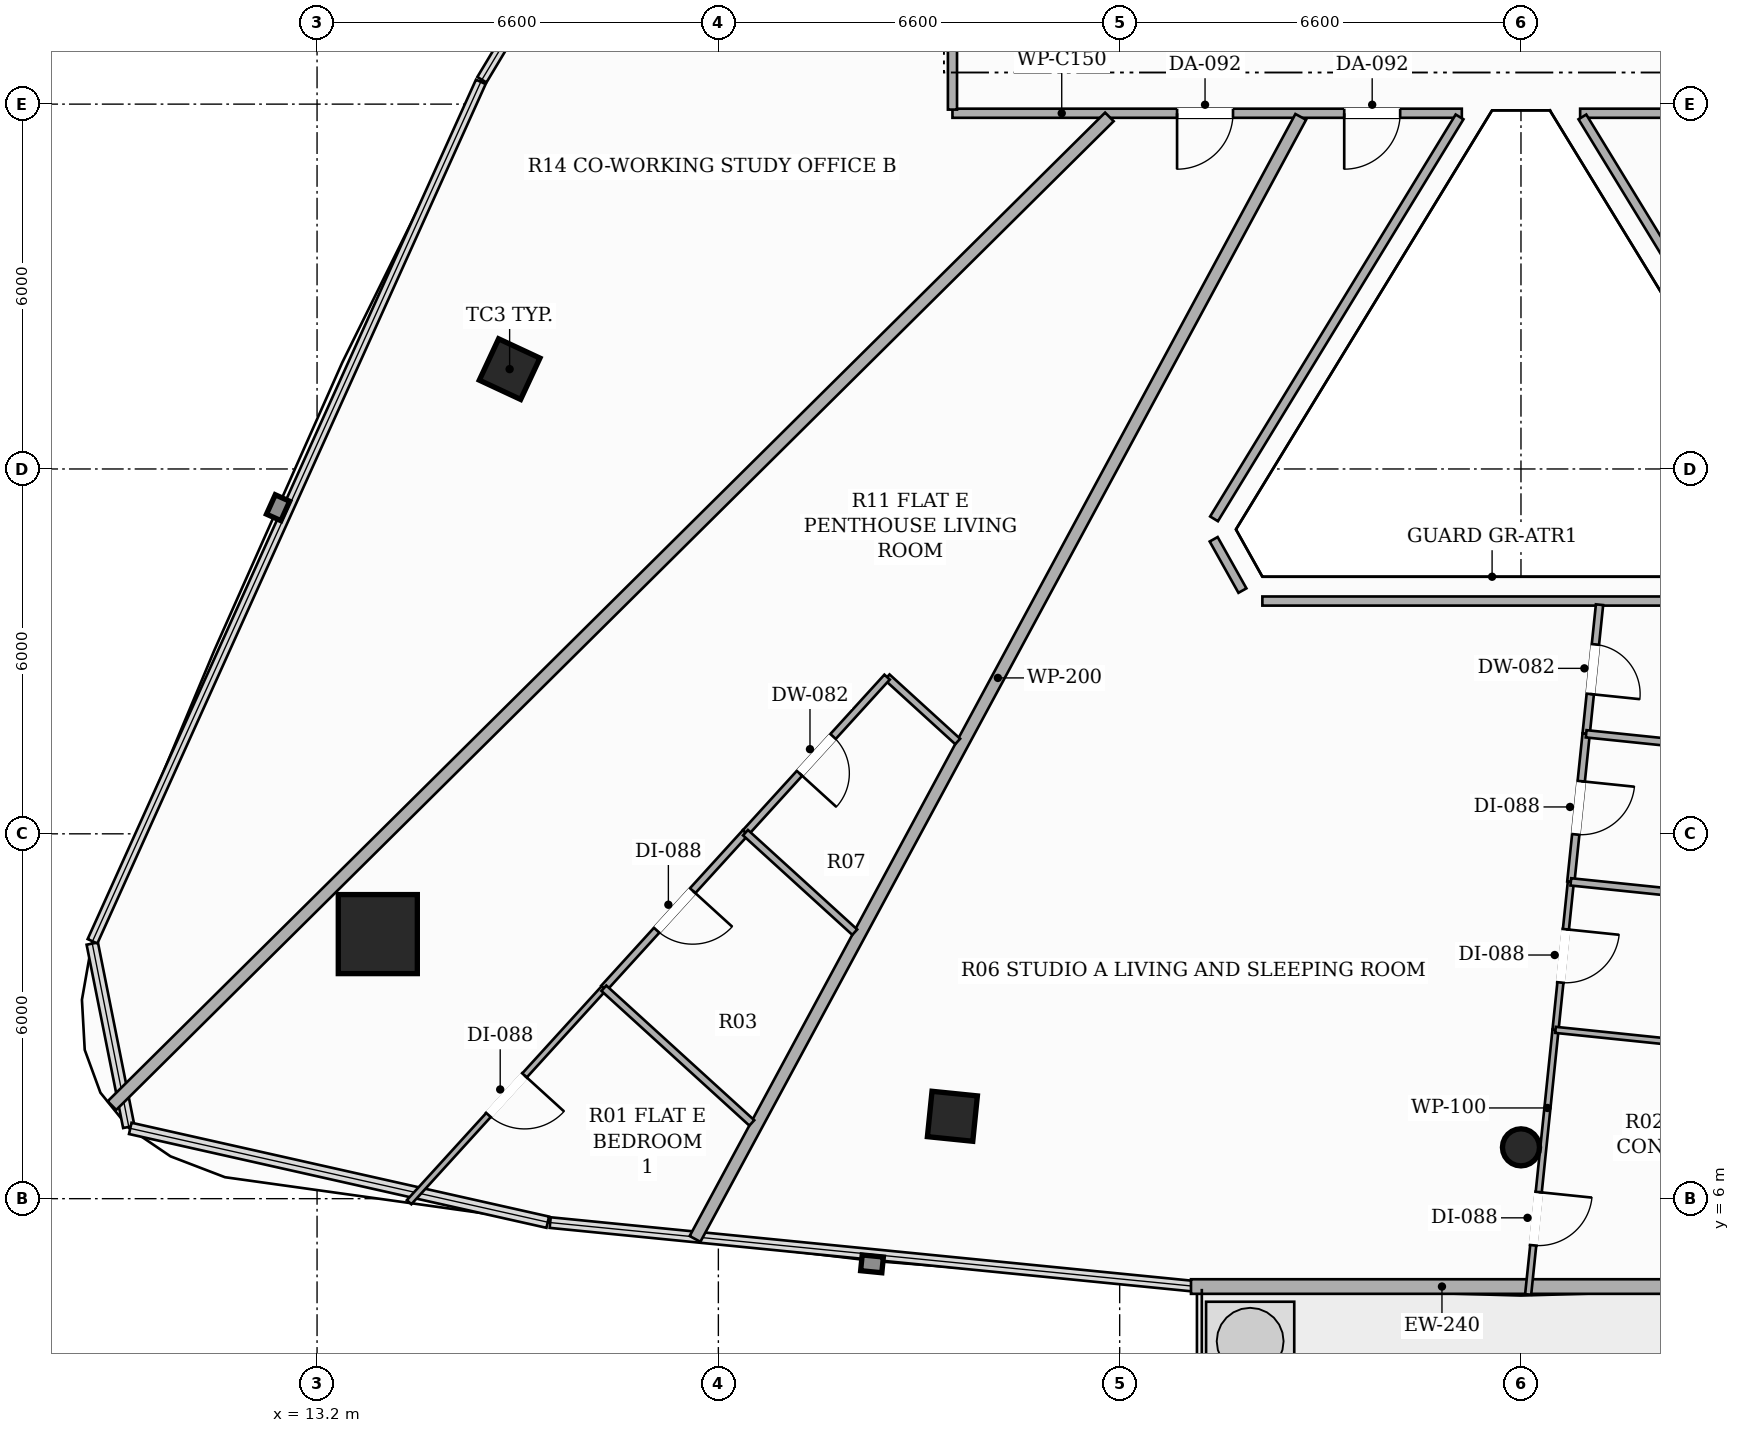
"""IFC4 building model, lengths in metres.
Left out: names, types, materials, properties, quantities, classifications, styles, units other than length and angle.
Written with IfcOpenShell. Run it as: python <this file> out.ifc"""

import sys

from ifc_helpers import new_model, si_unit, direction, frame, frame_2d, origin, origin_2d, place, context, subcontext, project, spatial, rectangle, hollow_rectangle, hollow_circle, extrude, element, fill, save


model = new_model("IFC4")
c1 = context("Model", 3, precision=1e-05, world=origin(), true_north=direction((0.0, 1.0)))
c2 = subcontext(c1, "Body", "Model", "MODEL_VIEW")
j1 = project(units=[si_unit("LENGTHUNIT", "METRE"), si_unit("PLANEANGLEUNIT", "RADIAN")], contexts=[c1])
p1 = place(None, origin())
s1 = spatial("IfcSite", under=j1, at=p1, CompositionType="ELEMENT")
p2 = place(p1, origin())
s2 = spatial("IfcBuilding", under=s1, at=p2, CompositionType="ELEMENT")
p3 = place(p2, frame((0.0, 0.0, 196.4)))
s3 = spatial("IfcBuildingStorey", under=s2, at=p3, CompositionType="ELEMENT", Elevation=196.4)
p4 = place(p3, frame((14.199, 10.351, 0.0), z_axis=(0.0, 0.0, 1.0), x_axis=(1.0, 0.0, 0.0)))
e1 = element("IfcColumn", 1, at=p4, inside=s3, PredefinedType="COLUMN", context=c2, shape_type="SweptSolid", body=[
    extrude(hollow_rectangle(XDim=1.3, YDim=1.3, WallThickness=0.04, at=origin_2d()), origin(), (0.0, 0.0, 1.0), 3.3),
])
for number, where, z_axis, x_axis in (
    (2, (16.367, 19.642, 0.0), (0.0, 0.0, 1.0), (0.423, 0.906, 0.0)),
    (3, (23.649, 7.355, 0.0), (0.0, 0.0, 1.0), (-0.995, 0.101, 0.0)),
):
    element("IfcColumn", number, at=place(p3, frame(where, z_axis=z_axis, x_axis=x_axis)), inside=s3, PredefinedType="COLUMN", context=c2, shape_type="SweptSolid", body=[
        extrude(hollow_rectangle(XDim=0.75, YDim=0.75, WallThickness=0.025, at=origin_2d()), origin(), (0.0, 0.0, 1.0), 3.3),
    ])
p5 = place(p3, frame((33.0, 6.844, 0.0), z_axis=(0.0, 0.0, 1.0), x_axis=(1.0, 0.0, 0.0)))
e4 = element("IfcColumn", 4, at=p5, inside=s3, PredefinedType="COLUMN", context=c2, shape_type="SweptSolid", body=[
    extrude(hollow_circle(Radius=0.305, WallThickness=0.016, at=origin_2d()), origin(), (0.0, 0.0, 1.0), 3.3),
])
p6 = place(p3, frame((27.573, 4.555, 0.0), z_axis=(0.0, 0.0, 1.0), x_axis=(1.0, 0.0, 0.0)))
e5 = element("IfcWall", 5, at=p6, inside=s3, PredefinedType="SOLIDWALL", context=c2, shape_type="SweptSolid", body=[
    extrude(rectangle(XDim=10.854, YDim=0.24, at=frame_2d((5.427, 0.0))), origin(), (0.0, 0.0, 1.0), 2.624),
])
p7 = place(p6, frame((8.355, 0.0, 0.0)))
e6 = element("IfcOpeningElement", 6, at=p7, cuts=e5, PredefinedType="OPENING", context=c2, shape_type="SweptSolid", body=[
    extrude(rectangle(XDim=1.8, YDim=2.2, at=frame_2d((0.9, 1.1))), frame((0.0, 0.13, 0.0), z_axis=(0.0, -1.0, 0.0), x_axis=(1.0, 0.0, 0.0)), (0.0, 0.0, 1.0), 0.26),
])
p8 = place(p3, frame((32.027, 23.85, 0.0), z_axis=(0.0, 0.0, 1.0), x_axis=(-1.0, 0.0, 0.0)))
e7 = element("IfcWall", 7, at=p8, inside=s3, PredefinedType="PARTITIONING", context=c2, shape_type="SweptSolid", body=[
    extrude(rectangle(XDim=8.377, YDim=0.15, at=frame_2d((4.188, 0.0))), origin(), (0.0, 0.0, 1.0), 2.565),
])
p9 = place(p8, frame((1.014, 0.0, 0.0)))
e8 = element("IfcOpeningElement", 8, at=p9, cuts=e7, PredefinedType="OPENING", context=c2, shape_type="SweptSolid", body=[
    extrude(rectangle(XDim=0.92, YDim=2.15, at=frame_2d((0.46, 1.075))), frame((0.0, 0.085, 0.0), z_axis=(0.0, -1.0, 0.0), x_axis=(1.0, 0.0, 0.0)), (0.0, 0.0, 1.0), 0.17),
])
p10 = place(p8, frame((3.763, 0.0, 0.0)))
e9 = element("IfcOpeningElement", 9, at=p10, cuts=e7, PredefinedType="OPENING", context=c2, shape_type="SweptSolid", body=[
    extrude(rectangle(XDim=0.92, YDim=2.15, at=frame_2d((0.46, 1.075))), frame((0.0, 0.085, 0.0), z_axis=(0.0, -1.0, 0.0), x_axis=(1.0, 0.0, 0.0)), (0.0, 0.0, 1.0), 0.17),
])
p11 = place(p3, frame((23.65, 23.91, 0.0), z_axis=(0.0, 0.0, 1.0), x_axis=(0.0, 1.0, 0.0)))
e10 = element("IfcWall", 10, at=p11, inside=s3, PredefinedType="PARTITIONING", context=c2, shape_type="SweptSolid", body=[
    extrude(rectangle(XDim=12.715, YDim=0.15, at=frame_2d((6.357, 0.0))), origin(), (0.0, 0.0, 1.0), 2.492),
])
p12 = place(p11, frame((5.917, 0.0, 0.0)))
e11 = element("IfcOpeningElement", 11, at=p12, cuts=e10, PredefinedType="OPENING", context=c2, shape_type="SweptSolid", body=[
    extrude(rectangle(XDim=0.88, YDim=2.1, at=frame_2d((0.44, 1.05))), frame((0.0, 0.085, 0.0), z_axis=(0.0, -1.0, 0.0), x_axis=(1.0, 0.0, 0.0)), (0.0, 0.0, 1.0), 0.17),
])
p13 = place(p3, frame((42.19, 23.85, 0.0), z_axis=(0.0, 0.0, 1.0), x_axis=(-1.0, 0.0, 0.0)))
e12 = element("IfcWall", 12, at=p13, inside=s3, PredefinedType="PARTITIONING", context=c2, shape_type="SweptSolid", body=[
    extrude(rectangle(XDim=8.217, YDim=0.15, at=frame_2d((4.108, 0.0))), origin(), (0.0, 0.0, 1.0), 2.565),
])
p14 = place(p13, frame((1.67, 0.0, 0.0)))
e13 = element("IfcOpeningElement", 13, at=p14, cuts=e12, PredefinedType="OPENING", context=c2, shape_type="SweptSolid", body=[
    extrude(rectangle(XDim=0.92, YDim=2.15, at=frame_2d((0.46, 1.075))), frame((0.0, 0.085, 0.0), z_axis=(0.0, -1.0, 0.0), x_axis=(1.0, 0.0, 0.0)), (0.0, 0.0, 1.0), 0.17),
])
p15 = place(p13, frame((5.12, 0.0, 0.0)))
e14 = element("IfcOpeningElement", 14, at=p15, cuts=e12, PredefinedType="OPENING", context=c2, shape_type="SweptSolid", body=[
    extrude(rectangle(XDim=0.88, YDim=2.1, at=frame_2d((0.44, 1.05))), frame((0.0, 0.085, 0.0), z_axis=(0.0, -1.0, 0.0), x_axis=(1.0, 0.0, 0.0)), (0.0, 0.0, 1.0), 0.17),
])
p16 = place(p3, frame((34.01, 23.79, 0.0), z_axis=(0.0, 0.0, 1.0), x_axis=(0.521316137909, -0.853363629618, 0.0)))
e15 = element("IfcWall", 15, at=p16, inside=s3, PredefinedType="PARTITIONING", context=c2, shape_type="SweptSolid", body=[
    extrude(rectangle(XDim=7.746, YDim=0.15, at=frame_2d((3.873, 0.0))), origin(), (0.0, 0.0, 1.0), 2.773),
])
p17 = place(p3, frame((37.253, 15.828, 0.0), z_axis=(0.0, 0.0, 1.0), x_axis=(-1.0, 0.0, 0.0)))
e16 = element("IfcWall", 16, at=p17, inside=s3, PredefinedType="PARTITIONING", context=c2, shape_type="SweptSolid", body=[
    extrude(rectangle(XDim=8.506, YDim=0.15, at=frame_2d((4.253, 0.0))), origin(), (0.0, 0.0, 1.0), 2.773),
])
p18 = place(p3, frame((28.419, 16.0, 0.0), z_axis=(0.0, 0.0, 1.0), x_axis=(-0.488810833005, 0.872389803664, 0.0)))
e17 = element("IfcWall", 17, at=p18, inside=s3, PredefinedType="PARTITIONING", context=c2, shape_type="SweptSolid", body=[
    extrude(rectangle(XDim=0.968, YDim=0.15, at=frame_2d((0.484, 0.0))), origin(), (0.0, 0.0, 1.0), 3.06),
])
p19 = place(p3, frame((27.952, 17.18, 0.0), z_axis=(0.0, 0.0, 1.0), x_axis=(0.521316137909, 0.853363629618, 0.0)))
e18 = element("IfcWall", 18, at=p19, inside=s3, PredefinedType="PARTITIONING", context=c2, shape_type="SweptSolid", body=[
    extrude(rectangle(XDim=7.746, YDim=0.15, at=frame_2d((3.873, 0.0))), origin(), (0.0, 0.0, 1.0), 2.773),
])
p20 = place(p3, frame((19.416, 5.338, 0.0), z_axis=(0.0, 0.0, 1.0), x_axis=(0.475065982754, 0.879950175879, 0.0)))
e19 = element("IfcWall", 19, at=p20, inside=s3, PredefinedType="PARTITIONING", context=c2, shape_type="SweptSolid", body=[
    extrude(rectangle(XDim=20.969, YDim=0.2, at=frame_2d((10.485, 0.0))), origin(), (0.0, 0.0, 1.0), 2.492),
])
p21 = place(p3, frame((26.231, 23.79, 0.0), z_axis=(0.0, 0.0, 1.0), x_axis=(-0.710239236144, -0.703960387693, 0.0)))
e20 = element("IfcWall", 20, at=p21, inside=s3, PredefinedType="PARTITIONING", context=c2, shape_type="SweptSolid", body=[
    extrude(rectangle(XDim=23.096, YDim=0.2, at=frame_2d((11.548, 0.0))), origin(), (0.0, 0.0, 1.0), 2.492),
])
p22 = place(p3, frame((34.292, 15.768, 0.0), z_axis=(0.0, 0.0, 1.0), x_axis=(-0.103059151492, -0.994675229054, 0.0)))
e21 = element("IfcWall", 21, at=p22, inside=s3, PredefinedType="PARTITIONING", context=c2, shape_type="SweptSolid", body=[
    extrude(rectangle(XDim=2.135, YDim=0.12, at=frame_2d((1.067, 0.0))), origin(), (0.0, 0.0, 1.0), 3.06),
])
p23 = place(p22, frame((0.657, 0.0, 0.0)))
e22 = element("IfcOpeningElement", 22, at=p23, cuts=e21, PredefinedType="OPENING", context=c2, shape_type="SweptSolid", body=[
    extrude(rectangle(XDim=0.82, YDim=2.1, at=frame_2d((0.41, 1.05))), frame((0.0, 0.07, 0.0), z_axis=(0.0, -1.0, 0.0), x_axis=(1.0, 0.0, 0.0)), (0.0, 0.0, 1.0), 0.14),
])
p24 = place(p3, frame((34.072, 13.645, 0.0), z_axis=(0.0, 0.0, 1.0), x_axis=(-0.102919566026, -0.994689681724, 0.0)))
e23 = element("IfcWall", 23, at=p24, inside=s3, PredefinedType="PARTITIONING", context=c2, shape_type="SweptSolid", body=[
    extrude(rectangle(XDim=2.448, YDim=0.12, at=frame_2d((1.224, 0.0))), origin(), (0.0, 0.0, 1.0), 3.06),
])
p25 = place(p24, frame((0.784, 0.0, 0.0)))
e24 = element("IfcOpeningElement", 24, at=p25, cuts=e23, PredefinedType="OPENING", context=c2, shape_type="SweptSolid", body=[
    extrude(rectangle(XDim=0.88, YDim=2.1, at=frame_2d((0.44, 1.05))), frame((0.0, 0.07, 0.0), z_axis=(0.0, -1.0, 0.0), x_axis=(1.0, 0.0, 0.0)), (0.0, 0.0, 1.0), 0.14),
])
p26 = place(p3, frame((33.568, 8.776, 0.0), z_axis=(0.0, 0.0, 1.0), x_axis=(-0.1029239069, -0.994689232569, 0.0)))
e25 = element("IfcWall", 25, at=p26, inside=s3, PredefinedType="PARTITIONING", context=c2, shape_type="SweptSolid", body=[
    extrude(rectangle(XDim=4.374, YDim=0.1, at=frame_2d((2.187, 0.0))), origin(), (0.0, 0.0, 1.0), 2.492),
])
p27 = place(p26, frame((2.682, 0.0, 0.0)))
e26 = element("IfcOpeningElement", 26, at=p27, cuts=e25, PredefinedType="OPENING", context=c2, shape_type="SweptSolid", body=[
    extrude(rectangle(XDim=0.88, YDim=2.1, at=frame_2d((0.44, 1.05))), frame((0.0, 0.06, 0.0), z_axis=(0.0, -1.0, 0.0), x_axis=(1.0, 0.0, 0.0)), (0.0, 0.0, 1.0), 0.12),
])
p28 = place(p3, frame((33.82, 11.21, 0.0), z_axis=(0.0, 0.0, 1.0), x_axis=(-0.102960420087, -0.994685453747, 0.0)))
e27 = element("IfcWall", 27, at=p28, inside=s3, PredefinedType="PARTITIONING", context=c2, shape_type="SweptSolid", body=[
    extrude(rectangle(XDim=2.447, YDim=0.1, at=frame_2d((1.224, 0.0))), origin(), (0.0, 0.0, 1.0), 3.06),
])
p29 = place(p28, frame((0.784, 0.0, 0.0)))
e28 = element("IfcOpeningElement", 28, at=p29, cuts=e27, PredefinedType="OPENING", context=c2, shape_type="SweptSolid", body=[
    extrude(rectangle(XDim=0.88, YDim=2.1, at=frame_2d((0.44, 1.05))), frame((0.0, 0.06, 0.0), z_axis=(0.0, -1.0, 0.0), x_axis=(1.0, 0.0, 0.0)), (0.0, 0.0, 1.0), 0.12),
])
p30 = place(p3, frame((38.025, 13.236, 0.0), z_axis=(0.0, 0.0, 1.0), x_axis=(-0.99469136016, 0.102903343108, 0.0)))
e29 = element("IfcWall", 29, at=p30, inside=s3, PredefinedType="PARTITIONING", context=c2, shape_type="SweptSolid", body=[
    extrude(rectangle(XDim=3.974, YDim=0.12, at=frame_2d((1.987, 0.0))), origin(), (0.0, 0.0, 1.0), 2.773),
])
p31 = place(p3, frame((38.777, 10.698, 0.0), z_axis=(0.0, 0.0, 1.0), x_axis=(-0.994708898019, 0.102733676081, 0.0)))
e30 = element("IfcWall", 30, at=p31, inside=s3, PredefinedType="PARTITIONING", context=c2, shape_type="SweptSolid", body=[
    extrude(rectangle(XDim=4.983, YDim=0.12, at=frame_2d((2.492, 0.0))), origin(), (0.0, 0.0, 1.0), 2.773),
])
p32 = place(p3, frame((33.568, 8.776, 0.0), z_axis=(0.0, 0.0, 1.0), x_axis=(0.994686760155, -0.102947798284, 0.0)))
e31 = element("IfcWall", 31, at=p32, inside=s3, PredefinedType="PARTITIONING", context=c2, shape_type="SweptSolid", body=[
    extrude(rectangle(XDim=5.993, YDim=0.1, at=frame_2d((2.996, 0.0))), origin(), (0.0, 0.0, 1.0), 2.773),
])
p33 = place(p3, frame((23.736, 13.519, 0.0), z_axis=(0.0, 0.0, 1.0), x_axis=(-0.739215251716, 0.673469235846, 0.0)))
e32 = element("IfcWall", 32, at=p33, inside=s3, PredefinedType="PARTITIONING", context=c2, shape_type="SweptSolid", body=[
    extrude(rectangle(XDim=1.571, YDim=0.12, at=frame_2d((0.785, 0.0))), origin(), (0.0, 0.0, 1.0), 3.06),
])
p34 = place(p3, frame((22.575, 14.577, 0.0), z_axis=(0.0, 0.0, 1.0), x_axis=(-0.673231148277, -0.739432093563, 0.0)))
e33 = element("IfcWall", 33, at=p34, inside=s3, PredefinedType="PARTITIONING", context=c2, shape_type="SweptSolid", body=[
    extrude(rectangle(XDim=3.459, YDim=0.12, at=frame_2d((1.729, 0.0))), origin(), (0.0, 0.0, 1.0), 2.773),
])
p35 = place(p34, frame((1.32, 0.0, 0.0)))
e34 = element("IfcOpeningElement", 34, at=p35, cuts=e33, PredefinedType="OPENING", context=c2, shape_type="SweptSolid", body=[
    extrude(rectangle(XDim=0.82, YDim=2.1, at=frame_2d((0.41, 1.05))), frame((0.0, 0.07, 0.0), z_axis=(0.0, -1.0, 0.0), x_axis=(1.0, 0.0, 0.0)), (0.0, 0.0, 1.0), 0.14),
])
p36 = place(p3, frame((20.246, 12.019, 0.0), z_axis=(0.0, 0.0, 1.0), x_axis=(-0.673234602732, -0.739428948368, 0.0)))
e35 = element("IfcWall", 35, at=p36, inside=s3, PredefinedType="PARTITIONING", context=c2, shape_type="SweptSolid", body=[
    extrude(rectangle(XDim=3.459, YDim=0.12, at=frame_2d((1.73, 0.0))), origin(), (0.0, 0.0, 1.0), 2.492),
])
p37 = place(p36, frame((1.29, 0.0, 0.0)))
e36 = element("IfcOpeningElement", 36, at=p37, cuts=e35, PredefinedType="OPENING", context=c2, shape_type="SweptSolid", body=[
    extrude(rectangle(XDim=0.88, YDim=2.1, at=frame_2d((0.44, 1.05))), frame((0.0, 0.07, 0.0), z_axis=(0.0, -1.0, 0.0), x_axis=(1.0, 0.0, 0.0)), (0.0, 0.0, 1.0), 0.14),
])
p38 = place(p3, frame((17.917, 9.461, 0.0), z_axis=(0.0, 0.0, 1.0), x_axis=(-0.673104266943, -0.739547595374, 0.0)))
e37 = element("IfcWall", 37, at=p38, inside=s3, PredefinedType="PARTITIONING", context=c2, shape_type="SweptSolid", body=[
    extrude(rectangle(XDim=4.758, YDim=0.1, at=frame_2d((2.379, 0.0))), origin(), (0.0, 0.0, 1.0), 2.492),
])
p39 = place(p38, frame((1.939, 0.0, 0.0)))
e38 = element("IfcOpeningElement", 38, at=p39, cuts=e37, PredefinedType="OPENING", context=c2, shape_type="SweptSolid", body=[
    extrude(rectangle(XDim=0.88, YDim=2.1, at=frame_2d((0.44, 1.05))), frame((0.0, 0.06, 0.0), z_axis=(0.0, -1.0, 0.0), x_axis=(1.0, 0.0, 0.0)), (0.0, 0.0, 1.0), 0.12),
])
p40 = place(p3, frame((22.043, 10.383, 0.0), z_axis=(0.0, 0.0, 1.0), x_axis=(-0.739435258465, 0.673227672143, 0.0)))
e39 = element("IfcWall", 39, at=p40, inside=s3, PredefinedType="PARTITIONING", context=c2, shape_type="SweptSolid", body=[
    extrude(rectangle(XDim=2.43, YDim=0.12, at=frame_2d((1.215, 0.0))), origin(), (0.0, 0.0, 1.0), 2.773),
])
p41 = place(p3, frame((20.35, 7.246, 0.0), z_axis=(0.0, 0.0, 1.0), x_axis=(-0.739496715577, 0.673160164932, 0.0)))
e40 = element("IfcWall", 40, at=p41, inside=s3, PredefinedType="PARTITIONING", context=c2, shape_type="SweptSolid", body=[
    extrude(rectangle(XDim=3.29, YDim=0.12, at=frame_2d((1.645, 0.0))), origin(), (0.0, 0.0, 1.0), 2.492),
])
p42 = place(p9, origin())
e41 = element("IfcDoor", 41, at=p42, inside=s3, OperationType="SINGLE_SWING_RIGHT", PredefinedType="DOOR", context=c2, shape_type="SweptSolid", body=[
    extrude(rectangle(XDim=0.92, YDim=2.15, at=frame_2d((0.46, 1.075))), frame((0.0, 0.025, 0.0), z_axis=(0.0, -1.0, 0.0), x_axis=(1.0, 0.0, 0.0)), (0.0, 0.0, 1.0), 0.05),
])
fill(e8, e41)
p43 = place(p23, origin())
e42 = element("IfcDoor", 42, at=p43, inside=s3, OperationType="SINGLE_SWING_RIGHT", PredefinedType="DOOR", context=c2, shape_type="SweptSolid", body=[
    extrude(rectangle(XDim=0.82, YDim=2.1, at=frame_2d((0.41, 1.05))), frame((0.0, 0.025, 0.0), z_axis=(0.0, -1.0, 0.0), x_axis=(1.0, 0.0, 0.0)), (0.0, 0.0, 1.0), 0.05),
])
fill(e22, e42)
p44 = place(p25, origin())
e43 = element("IfcDoor", 43, at=p44, inside=s3, OperationType="SINGLE_SWING_LEFT", PredefinedType="DOOR", context=c2, shape_type="SweptSolid", body=[
    extrude(rectangle(XDim=0.88, YDim=2.1, at=frame_2d((0.44, 1.05))), frame((0.0, 0.025, 0.0), z_axis=(0.0, -1.0, 0.0), x_axis=(1.0, 0.0, 0.0)), (0.0, 0.0, 1.0), 0.05),
])
fill(e24, e43)
p45 = place(p27, origin())
e44 = element("IfcDoor", 44, at=p45, inside=s3, OperationType="SINGLE_SWING_LEFT", PredefinedType="DOOR", context=c2, shape_type="SweptSolid", body=[
    extrude(rectangle(XDim=0.88, YDim=2.1, at=frame_2d((0.44, 1.05))), frame((0.0, 0.025, 0.0), z_axis=(0.0, -1.0, 0.0), x_axis=(1.0, 0.0, 0.0)), (0.0, 0.0, 1.0), 0.05),
])
fill(e26, e44)
p46 = place(p29, origin())
e45 = element("IfcDoor", 45, at=p46, inside=s3, OperationType="SINGLE_SWING_LEFT", PredefinedType="DOOR", context=c2, shape_type="SweptSolid", body=[
    extrude(rectangle(XDim=0.88, YDim=2.1, at=frame_2d((0.44, 1.05))), frame((0.0, 0.025, 0.0), z_axis=(0.0, -1.0, 0.0), x_axis=(1.0, 0.0, 0.0)), (0.0, 0.0, 1.0), 0.05),
])
fill(e28, e45)
p47 = place(p10, origin())
e46 = element("IfcDoor", 46, at=p47, inside=s3, OperationType="SINGLE_SWING_RIGHT", PredefinedType="DOOR", context=c2, shape_type="SweptSolid", body=[
    extrude(rectangle(XDim=0.92, YDim=2.15, at=frame_2d((0.46, 1.075))), frame((0.0, 0.025, 0.0), z_axis=(0.0, -1.0, 0.0), x_axis=(1.0, 0.0, 0.0)), (0.0, 0.0, 1.0), 0.05),
])
fill(e9, e46)
p48 = place(p35, origin())
e47 = element("IfcDoor", 47, at=p48, inside=s3, OperationType="SINGLE_SWING_RIGHT", PredefinedType="DOOR", context=c2, shape_type="SweptSolid", body=[
    extrude(rectangle(XDim=0.82, YDim=2.1, at=frame_2d((0.41, 1.05))), frame((0.0, 0.025, 0.0), z_axis=(0.0, -1.0, 0.0), x_axis=(1.0, 0.0, 0.0)), (0.0, 0.0, 1.0), 0.05),
])
fill(e34, e47)
p49 = place(p37, origin())
e48 = element("IfcDoor", 48, at=p49, inside=s3, OperationType="SINGLE_SWING_LEFT", PredefinedType="DOOR", context=c2, shape_type="SweptSolid", body=[
    extrude(rectangle(XDim=0.88, YDim=2.1, at=frame_2d((0.44, 1.05))), frame((0.0, 0.025, 0.0), z_axis=(0.0, -1.0, 0.0), x_axis=(1.0, 0.0, 0.0)), (0.0, 0.0, 1.0), 0.05),
])
fill(e36, e48)
p50 = place(p39, origin())
e49 = element("IfcDoor", 49, at=p50, inside=s3, OperationType="SINGLE_SWING_LEFT", PredefinedType="DOOR", context=c2, shape_type="SweptSolid", body=[
    extrude(rectangle(XDim=0.88, YDim=2.1, at=frame_2d((0.44, 1.05))), frame((0.0, 0.025, 0.0), z_axis=(0.0, -1.0, 0.0), x_axis=(1.0, 0.0, 0.0)), (0.0, 0.0, 1.0), 0.05),
])
fill(e38, e49)
save(model, sys.argv[1])
